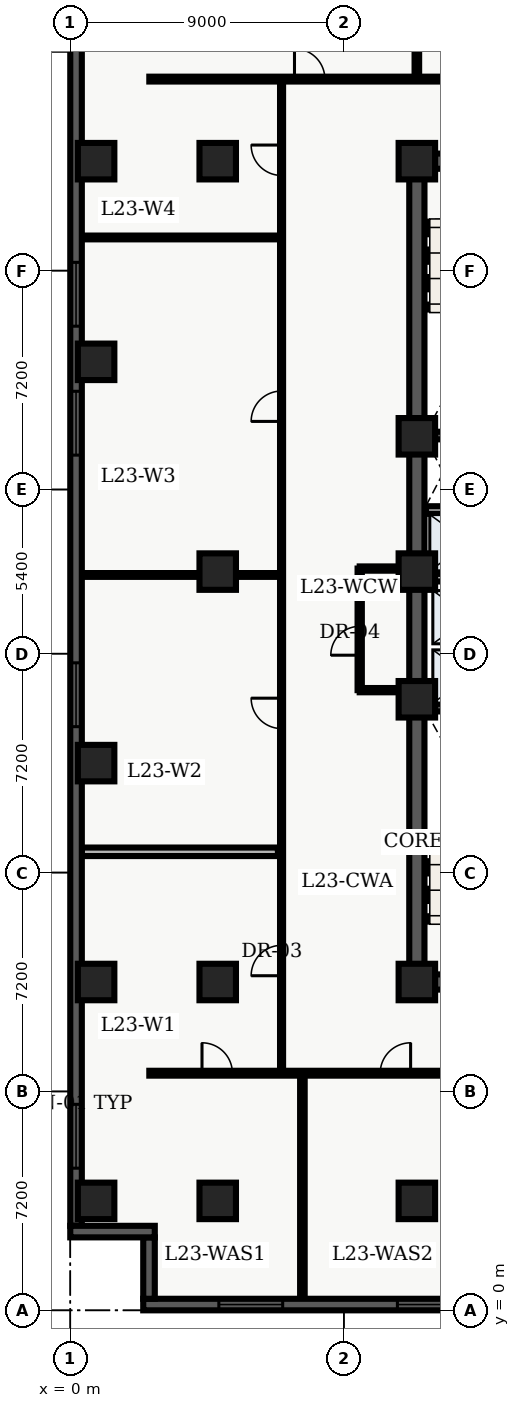
"""IFC4 building model, lengths in metres.
Left out: names, types, materials, properties, quantities, classifications, styles, units other than length and angle.
Written with IfcOpenShell. Run it as: python <this file> out.ifc"""

import sys

from ifc_helpers import new_model, entity, si_unit, converted_unit, direction, frame, origin_with_axes, origin_2d_with_axis, place, context, subcontext, project, spatial, polyline, rectangle, outline, extrude, element, fill, save


model = new_model("IFC4")
c1 = context("Model", 3, precision=1e-05, world=origin_with_axes(), true_north=direction((0.0, 1.0)))
c2 = subcontext(c1, "Body", "Model", "MODEL_VIEW")
j1 = project(units=[si_unit("LENGTHUNIT", "METRE"), converted_unit("PLANEANGLEUNIT", "DEGREE", entity("IfcPlaneAngleMeasure", 0.017), si_unit("PLANEANGLEUNIT", "RADIAN"), dimensions=[0, 0, 0, 0, 0, 0, 0])], contexts=[c1])
p1 = place(None, origin_with_axes())
s1 = spatial("IfcSite", under=j1, at=p1, CompositionType="ELEMENT")
p2 = place(p1, origin_with_axes())
s2 = spatial("IfcBuilding", under=s1, at=p2, CompositionType="ELEMENT")
p3 = place(p2, frame((0.0, 0.0, 96.9), z_axis=(0.0, 0.0, 1.0), x_axis=(1.0, 0.0, 0.0)))
s3 = spatial("IfcBuildingStorey", under=s2, at=p3, CompositionType="ELEMENT", Elevation=96.9)
p4 = place(p3, frame((11.4, 10.8, 0.0), z_axis=(0.0, 0.0, 1.0), x_axis=(0.0, 1.0, 0.0)))
e1 = element("IfcWall", 1, at=p4, inside=s3, PredefinedType="SHEAR", context=c2, shape_type="SweptSolid", body=[
    extrude(outline(polyline([(0.0, -0.25), (27.0, -0.25), (27.0, 0.25), (0.0, 0.25), (0.0, -0.25)])), origin_with_axes(), (0.0, 0.0, 1.0), 3.66),
])
p5 = place(p3, frame((11.4, 10.8, 0.0), z_axis=(0.0, 0.0, 1.0), x_axis=(1.0, 0.0, 0.0)))
e2 = element("IfcWall", 2, at=p5, inside=s3, PredefinedType="SHEAR", context=c2, shape_type="SweptSolid", body=[
    extrude(outline(polyline([(0.0, -0.25), (7.2, -0.25), (7.2, 0.25), (0.0, 0.25), (0.0, -0.25)])), origin_with_axes(), (0.0, 0.0, 1.0), 3.66),
])
p6 = place(p5, frame((2.625, 0.0, 0.0), z_axis=(0.0, 0.0, 1.0), x_axis=(1.0, 0.0, 0.0)))
e3 = element("IfcOpeningElement", 3, at=p6, cuts=e2, PredefinedType="OPENING", context=c2, shape_type="SweptSolid", body=[
    extrude(rectangle(XDim=1.05, YDim=0.52, at=origin_2d_with_axis()), origin_with_axes(), (0.0, 0.0, 1.0), 2.15),
])
p7 = place(p3, frame((11.4, 37.8, 0.0), z_axis=(0.0, 0.0, 1.0), x_axis=(1.0, 0.0, 0.0)))
e4 = element("IfcWall", 4, at=p7, inside=s3, PredefinedType="SHEAR", context=c2, shape_type="SweptSolid", body=[
    extrude(outline(polyline([(0.0, -0.25), (7.2, -0.25), (7.2, 0.25), (0.0, 0.25), (0.0, -0.25)])), origin_with_axes(), (0.0, 0.0, 1.0), 3.66),
])
p8 = place(p7, frame((2.625, 0.0, 0.0), z_axis=(0.0, 0.0, 1.0), x_axis=(1.0, 0.0, 0.0)))
e5 = element("IfcOpeningElement", 5, at=p8, cuts=e4, PredefinedType="OPENING", context=c2, shape_type="SweptSolid", body=[
    extrude(rectangle(XDim=1.05, YDim=0.52, at=origin_2d_with_axis()), origin_with_axes(), (0.0, 0.0, 1.0), 2.15),
])
for number, where, z_axis, x_axis in (
    (6, (11.65, 19.825, 0.0), (0.0, 0.0, 1.0), (1.0, 0.0, 0.0)),
    (7, (11.65, 28.775, 0.0), (0.0, 0.0, 1.0), (1.0, 0.0, 0.0)),
):
    element("IfcWall", number, at=place(p3, frame(where, z_axis=z_axis, x_axis=x_axis)), inside=s3, PredefinedType="SHEAR", context=c2, shape_type="SweptSolid", body=[
        extrude(outline(polyline([(0.0, -0.125), (6.7, -0.125), (6.7, 0.125), (0.0, 0.125), (0.0, -0.125)])), origin_with_axes(), (0.0, 0.0, 1.0), 3.66),
    ])
p9 = place(p3, frame((11.7, 24.1, 0.0), z_axis=(0.0, 0.0, 1.0), x_axis=(1.0, 0.0, 0.0)))
e8 = element("IfcWall", 8, at=p9, inside=s3, PredefinedType="SOLIDWALL", context=c2, shape_type="SweptSolid", body=[
    extrude(outline(polyline([(0.0, -0.125), (6.6, -0.125), (6.6, 0.125), (0.0, 0.125), (0.0, -0.125)])), origin_with_axes(), (0.0, 0.0, 1.0), 2.7),
])
p10 = place(p9, frame((3.75, 0.0, 0.0), z_axis=(0.0, 0.0, 1.0), x_axis=(1.0, 0.0, 0.0)))
e9 = element("IfcOpeningElement", 9, at=p10, cuts=e8, PredefinedType="OPENING", context=c2, shape_type="SweptSolid", body=[
    extrude(rectangle(XDim=0.9, YDim=0.27, at=origin_2d_with_axis()), origin_with_axes(), (0.0, 0.0, 1.0), 2.15),
])
p11 = place(p3, frame((11.7, 26.325, 0.0), z_axis=(0.0, 0.0, 1.0), x_axis=(1.0, 0.0, 0.0)))
e10 = element("IfcWall", 10, at=p11, inside=s3, PredefinedType="SOLIDWALL", context=c2, shape_type="SweptSolid", body=[
    extrude(outline(polyline([(0.0, -0.125), (6.6, -0.125), (6.6, 0.125), (0.0, 0.125), (0.0, -0.125)])), origin_with_axes(), (0.0, 0.0, 1.0), 2.7),
])
p12 = place(p11, frame((3.5, 0.0, 0.0), z_axis=(0.0, 0.0, 1.0), x_axis=(1.0, 0.0, 0.0)))
e11 = element("IfcOpeningElement", 11, at=p12, cuts=e10, PredefinedType="OPENING", context=c2, shape_type="SweptSolid", body=[
    extrude(rectangle(XDim=0.9, YDim=0.27, at=origin_2d_with_axis()), origin_with_axes(), (0.0, 0.0, 1.0), 2.15),
])
for number, where, z_axis, x_axis in (
    (12, (11.4, 3.6, 0.0), (0.0, 0.0, 1.0), (1.0, 0.0, 0.0)),
    (13, (11.4, 10.8, 0.0), (0.0, 0.0, 1.0), (1.0, 0.0, 0.0)),
    (14, (11.4, 20.1, 0.0), (0.0, 0.0, 1.0), (1.0, 0.0, 0.0)),
    (15, (11.4, 24.3, 0.0), (0.0, 0.0, 1.0), (1.0, 0.0, 0.0)),
    (16, (11.4, 28.75, 0.0), (0.0, 0.0, 1.0), (1.0, 0.0, 0.0)),
    (17, (11.4, 37.8, 0.0), (0.0, 0.0, 1.0), (1.0, 0.0, 0.0)),
    (18, (4.85, 3.6, 0.0), (0.0, 0.0, 1.0), (1.0, 0.0, 0.0)),
    (19, (4.85, 10.8, 0.0), (0.0, 0.0, 1.0), (1.0, 0.0, 0.0)),
    (20, (4.85, 24.3, 0.0), (0.0, 0.0, 1.0), (1.0, 0.0, 0.0)),
    (21, (4.85, 37.8, 0.0), (0.0, 0.0, 1.0), (1.0, 0.0, 0.0)),
    (22, (0.85, 3.6, 0.0), (0.0, 0.0, 1.0), (1.0, 0.0, 0.0)),
    (23, (0.85, 10.8, 0.0), (0.0, 0.0, 1.0), (1.0, 0.0, 0.0)),
    (24, (0.85, 18.0, 0.0), (0.0, 0.0, 1.0), (1.0, 0.0, 0.0)),
    (25, (0.85, 31.2, 0.0), (0.0, 0.0, 1.0), (1.0, 0.0, 0.0)),
    (26, (0.85, 37.8, 0.0), (0.0, 0.0, 1.0), (1.0, 0.0, 0.0)),
):
    element("IfcColumn", number, at=place(p3, frame(where, z_axis=z_axis, x_axis=x_axis)), inside=s3, PredefinedType="COLUMN", context=c2, shape_type="SweptSolid", body=[
        extrude(rectangle(XDim=1.2, YDim=1.2, at=origin_2d_with_axis()), origin_with_axes(), (0.0, 0.0, 1.0), 3.9),
    ])
p13 = place(p3, frame((9.52, 20.4, 0.0), z_axis=(0.0, 0.0, 1.0), x_axis=(0.0, 1.0, 0.0)))
e27 = element("IfcWall", 27, at=p13, inside=s3, PredefinedType="PARTITIONING", context=c2, shape_type="SweptSolid", body=[
    extrude(outline(polyline([(0.0, -0.07), (4.0, -0.07), (4.0, 0.07), (0.0, 0.07), (0.0, -0.07)])), origin_with_axes(), (0.0, 0.0, 1.0), 2.7),
])
p14 = place(p13, frame((1.625, 0.0, 0.0), z_axis=(0.0, 0.0, 1.0), x_axis=(1.0, 0.0, 0.0)))
e28 = element("IfcOpeningElement", 28, at=p14, cuts=e27, PredefinedType="OPENING", context=c2, shape_type="SweptSolid", body=[
    extrude(rectangle(XDim=0.95, YDim=0.16, at=origin_2d_with_axis()), origin_with_axes(), (0.0, 0.0, 1.0), 2.15),
])
for number, where, z_axis, x_axis in (
    (29, (9.52, 20.4, 0.0), (0.0, 0.0, 1.0), (1.0, 0.0, 0.0)),
    (30, (9.52, 24.4, 0.0), (0.0, 0.0, 1.0), (1.0, 0.0, 0.0)),
):
    element("IfcWall", number, at=place(p3, frame(where, z_axis=z_axis, x_axis=x_axis)), inside=s3, PredefinedType="PARTITIONING", context=c2, shape_type="SweptSolid", body=[
        extrude(outline(polyline([(0.0, -0.07), (1.58, -0.07), (1.58, 0.07), (0.0, 0.07), (0.0, -0.07)])), origin_with_axes(), (0.0, 0.0, 1.0), 2.7),
    ])
p15 = place(p3, frame((2.6, 7.8, 0.0), z_axis=(0.0, 0.0, 1.0), x_axis=(1.0, 0.0, 0.0)))
e31 = element("IfcWall", 31, at=p15, inside=s3, PredefinedType="PARTITIONING", context=c2, shape_type="SweptSolid", body=[
    extrude(outline(polyline([(0.0, -0.08), (18.625, -0.08), (18.625, 0.08), (0.0, 0.08), (0.0, -0.08)])), origin_with_axes(), (0.0, 0.0, 1.0), 2.7),
])
p16 = place(p15, frame((2.233, 0.0, 0.0), z_axis=(0.0, 0.0, 1.0), x_axis=(1.0, 0.0, 0.0)))
e32 = element("IfcOpeningElement", 32, at=p16, cuts=e31, PredefinedType="OPENING", context=c2, shape_type="SweptSolid", body=[
    extrude(rectangle(XDim=1.0, YDim=0.18, at=origin_2d_with_axis()), origin_with_axes(), (0.0, 0.0, 1.0), 2.15),
])
p17 = place(p15, frame((8.095, 0.0, 0.0), z_axis=(0.0, 0.0, 1.0), x_axis=(1.0, 0.0, 0.0)))
e33 = element("IfcOpeningElement", 33, at=p17, cuts=e31, PredefinedType="OPENING", context=c2, shape_type="SweptSolid", body=[
    extrude(rectangle(XDim=1.0, YDim=0.18, at=origin_2d_with_axis()), origin_with_axes(), (0.0, 0.0, 1.0), 2.15),
])
p18 = place(p15, frame((14.827, 0.0, 0.0), z_axis=(0.0, 0.0, 1.0), x_axis=(1.0, 0.0, 0.0)))
e34 = element("IfcOpeningElement", 34, at=p18, cuts=e31, PredefinedType="OPENING", context=c2, shape_type="SweptSolid", body=[
    extrude(rectangle(XDim=1.0, YDim=0.18, at=origin_2d_with_axis()), origin_with_axes(), (0.0, 0.0, 1.0), 2.15),
])
p19 = place(p3, frame((2.6, 40.5, 0.0), z_axis=(0.0, 0.0, 1.0), x_axis=(1.0, 0.0, 0.0)))
e35 = element("IfcWall", 35, at=p19, inside=s3, PredefinedType="PARTITIONING", context=c2, shape_type="SweptSolid", body=[
    extrude(outline(polyline([(0.0, -0.08), (18.65, -0.08), (18.65, 0.08), (0.0, 0.08), (0.0, -0.08)])), origin_with_axes(), (0.0, 0.0, 1.0), 2.7),
])
p20 = place(p19, frame((5.275, 0.0, 0.0), z_axis=(0.0, 0.0, 1.0), x_axis=(1.0, 0.0, 0.0)))
e36 = element("IfcOpeningElement", 36, at=p20, cuts=e35, PredefinedType="OPENING", context=c2, shape_type="SweptSolid", body=[
    extrude(rectangle(XDim=1.0, YDim=0.18, at=origin_2d_with_axis()), origin_with_axes(), (0.0, 0.0, 1.0), 2.15),
])
p21 = place(p19, frame((12.61, 0.0, 0.0), z_axis=(0.0, 0.0, 1.0), x_axis=(1.0, 0.0, 0.0)))
e37 = element("IfcOpeningElement", 37, at=p21, cuts=e35, PredefinedType="OPENING", context=c2, shape_type="SweptSolid", body=[
    extrude(rectangle(XDim=1.2, YDim=0.18, at=origin_2d_with_axis()), origin_with_axes(), (0.0, 0.0, 1.0), 2.2),
])
p22 = place(p3, frame((6.95, 7.8, 0.0), z_axis=(0.0, 0.0, 1.0), x_axis=(0.0, 1.0, 0.0)))
e38 = element("IfcWall", 38, at=p22, inside=s3, PredefinedType="PARTITIONING", context=c2, shape_type="SweptSolid", body=[
    extrude(outline(polyline([(0.0, -0.05), (32.7, -0.05), (32.7, 0.05), (0.0, 0.05), (0.0, -0.05)])), origin_with_axes(), (0.0, 0.0, 1.0), 2.7),
])
p23 = place(p22, frame((3.707, 0.0, 0.0), z_axis=(0.0, 0.0, 1.0), x_axis=(1.0, 0.0, 0.0)))
e39 = element("IfcOpeningElement", 39, at=p23, cuts=e38, PredefinedType="OPENING", context=c2, shape_type="SweptSolid", body=[
    extrude(rectangle(XDim=1.0, YDim=0.12, at=origin_2d_with_axis()), origin_with_axes(), (0.0, 0.0, 1.0), 2.15),
])
p24 = place(p22, frame((11.836, 0.0, 0.0), z_axis=(0.0, 0.0, 1.0), x_axis=(1.0, 0.0, 0.0)))
e40 = element("IfcOpeningElement", 40, at=p24, cuts=e38, PredefinedType="OPENING", context=c2, shape_type="SweptSolid", body=[
    extrude(rectangle(XDim=1.0, YDim=0.12, at=origin_2d_with_axis()), origin_with_axes(), (0.0, 0.0, 1.0), 2.15),
])
p25 = place(p22, frame((21.94, 0.0, 0.0), z_axis=(0.0, 0.0, 1.0), x_axis=(1.0, 0.0, 0.0)))
e41 = element("IfcOpeningElement", 41, at=p25, cuts=e38, PredefinedType="OPENING", context=c2, shape_type="SweptSolid", body=[
    extrude(rectangle(XDim=1.0, YDim=0.12, at=origin_2d_with_axis()), origin_with_axes(), (0.0, 0.0, 1.0), 2.15),
])
p26 = place(p22, frame((30.03, 0.0, 0.0), z_axis=(0.0, 0.0, 1.0), x_axis=(1.0, 0.0, 0.0)))
e42 = element("IfcOpeningElement", 42, at=p26, cuts=e38, PredefinedType="OPENING", context=c2, shape_type="SweptSolid", body=[
    extrude(rectangle(XDim=1.0, YDim=0.12, at=origin_2d_with_axis()), origin_with_axes(), (0.0, 0.0, 1.0), 2.15),
])
p27 = place(p3, frame((0.375, 15.083, 0.0), z_axis=(0.0, 0.0, 1.0), x_axis=(1.0, 0.0, 0.0)))
e43 = element("IfcWall", 43, at=p27, inside=s3, PredefinedType="PARTITIONING", context=c2, shape_type="SweptSolid", body=[
    extrude(outline(polyline([(0.0, -0.14), (6.455, -0.14), (6.455, 0.14), (0.0, 0.14), (0.0, -0.14)])), origin_with_axes(), (0.0, 0.0, 1.0), 2.7),
])
for number, where, z_axis, x_axis in (
    (44, (0.375, 24.189, 0.0), (0.0, 0.0, 1.0), (1.0, 0.0, 0.0)),
    (45, (0.375, 35.291, 0.0), (0.0, 0.0, 1.0), (1.0, 0.0, 0.0)),
):
    element("IfcWall", number, at=place(p3, frame(where, z_axis=z_axis, x_axis=x_axis)), inside=s3, PredefinedType="PARTITIONING", context=c2, shape_type="SweptSolid", body=[
        extrude(outline(polyline([(0.0, -0.062), (6.455, -0.062), (6.455, 0.062), (0.0, 0.062), (0.0, -0.062)])), origin_with_axes(), (0.0, 0.0, 1.0), 2.7),
    ])
p28 = place(p3, frame((7.635, 0.36, 0.0), z_axis=(0.0, 0.0, 1.0), x_axis=(0.0, 1.0, 0.0)))
e46 = element("IfcWall", 46, at=p28, inside=s3, PredefinedType="PARTITIONING", context=c2, shape_type="SweptSolid", body=[
    extrude(outline(polyline([(0.0, -0.075), (7.34, -0.075), (7.34, 0.075), (0.0, 0.075), (0.0, -0.075)])), origin_with_axes(), (0.0, 0.0, 1.0), 2.7),
])
p29 = place(p3, frame((11.4, 40.6, 0.0), z_axis=(0.0, 0.0, 1.0), x_axis=(0.0, 1.0, 0.0)))
e47 = element("IfcWall", 47, at=p29, inside=s3, PredefinedType="PARTITIONING", context=c2, shape_type="SweptSolid", body=[
    extrude(outline(polyline([(0.0, -0.075), (7.64, -0.075), (7.64, 0.075), (0.0, 0.075), (0.0, -0.075)])), origin_with_axes(), (0.0, 0.0, 1.0), 2.7),
])
p30 = place(p3, frame((0.19, 2.78, 0.0), z_axis=(0.0, 0.0, 1.0), x_axis=(0.0, 1.0, 0.0)))
e48 = element("IfcWall", 48, at=p30, inside=s3, PredefinedType="SOLIDWALL", context=c2, shape_type="SweptSolid", body=[
    extrude(outline(polyline([(0.0, -0.19), (43.42, -0.19), (43.42, 0.19), (0.0, 0.19), (0.0, -0.19)])), origin_with_axes(), (0.0, 0.0, 1.0), 3.66),
])
p31 = place(p30, frame((2.946, 0.0, 0.45), z_axis=(0.0, 0.0, 1.0), x_axis=(1.0, 0.0, 0.0)))
e49 = element("IfcOpeningElement", 49, at=p31, cuts=e48, PredefinedType="OPENING", context=c2, shape_type="SweptSolid", body=[
    extrude(rectangle(XDim=2.1, YDim=0.4, at=origin_2d_with_axis()), origin_with_axes(), (0.0, 0.0, 1.0), 2.2),
])
p32 = place(p30, frame((17.469, 0.0, 0.45), z_axis=(0.0, 0.0, 1.0), x_axis=(1.0, 0.0, 0.0)))
e50 = element("IfcOpeningElement", 50, at=p32, cuts=e48, PredefinedType="OPENING", context=c2, shape_type="SweptSolid", body=[
    extrude(rectangle(XDim=2.1, YDim=0.4, at=origin_2d_with_axis()), origin_with_axes(), (0.0, 0.0, 1.0), 2.2),
])
p33 = place(p30, frame((26.401, 0.0, 0.45), z_axis=(0.0, 0.0, 1.0), x_axis=(1.0, 0.0, 0.0)))
e51 = element("IfcOpeningElement", 51, at=p33, cuts=e48, PredefinedType="OPENING", context=c2, shape_type="SweptSolid", body=[
    extrude(rectangle(XDim=2.1, YDim=0.4, at=origin_2d_with_axis()), origin_with_axes(), (0.0, 0.0, 1.0), 2.2),
])
p34 = place(p30, frame((30.642, 0.0, 0.45), z_axis=(0.0, 0.0, 1.0), x_axis=(1.0, 0.0, 0.0)))
e52 = element("IfcOpeningElement", 52, at=p34, cuts=e48, PredefinedType="OPENING", context=c2, shape_type="SweptSolid", body=[
    extrude(rectangle(XDim=2.1, YDim=0.4, at=origin_2d_with_axis()), origin_with_axes(), (0.0, 0.0, 1.0), 2.2),
])
p35 = place(p30, frame((40.024, 0.0, 0.45), z_axis=(0.0, 0.0, 1.0), x_axis=(1.0, 0.0, 0.0)))
e53 = element("IfcOpeningElement", 53, at=p35, cuts=e48, PredefinedType="OPENING", context=c2, shape_type="SweptSolid", body=[
    extrude(rectangle(XDim=2.1, YDim=0.4, at=origin_2d_with_axis()), origin_with_axes(), (0.0, 0.0, 1.0), 2.2),
])
p36 = place(p3, frame((21.22, 0.19, 0.0), z_axis=(0.0, 0.0, 1.0), x_axis=(-1.0, 0.0, 0.0)))
e54 = element("IfcWall", 54, at=p36, inside=s3, PredefinedType="SOLIDWALL", context=c2, shape_type="SweptSolid", body=[
    extrude(outline(polyline([(0.0, -0.19), (18.82, -0.19), (18.82, 0.19), (0.0, 0.19), (0.0, -0.19)])), origin_with_axes(), (0.0, 0.0, 1.0), 3.66),
])
p37 = place(p36, frame((3.537, 0.0, 0.45), z_axis=(0.0, 0.0, 1.0), x_axis=(1.0, 0.0, 0.0)))
e55 = element("IfcOpeningElement", 55, at=p37, cuts=e54, PredefinedType="OPENING", context=c2, shape_type="SweptSolid", body=[
    extrude(rectangle(XDim=2.1, YDim=0.4, at=origin_2d_with_axis()), origin_with_axes(), (0.0, 0.0, 1.0), 2.2),
])
p38 = place(p36, frame((9.41, 0.0, 0.45), z_axis=(0.0, 0.0, 1.0), x_axis=(1.0, 0.0, 0.0)))
e56 = element("IfcOpeningElement", 56, at=p38, cuts=e54, PredefinedType="OPENING", context=c2, shape_type="SweptSolid", body=[
    extrude(rectangle(XDim=2.1, YDim=0.4, at=origin_2d_with_axis()), origin_with_axes(), (0.0, 0.0, 1.0), 2.2),
])
p39 = place(p36, frame((15.283, 0.0, 0.45), z_axis=(0.0, 0.0, 1.0), x_axis=(1.0, 0.0, 0.0)))
e57 = element("IfcOpeningElement", 57, at=p39, cuts=e54, PredefinedType="OPENING", context=c2, shape_type="SweptSolid", body=[
    extrude(rectangle(XDim=2.1, YDim=0.4, at=origin_2d_with_axis()), origin_with_axes(), (0.0, 0.0, 1.0), 2.2),
])
p40 = place(p3, frame((2.59, 0.38, 0.0), z_axis=(0.0, 0.0, 1.0), x_axis=(0.0, 1.0, 0.0)))
e58 = element("IfcWall", 58, at=p40, inside=s3, PredefinedType="SOLIDWALL", context=c2, shape_type="SweptSolid", body=[
    extrude(outline(polyline([(0.0, -0.19), (2.02, -0.19), (2.02, 0.19), (0.0, 0.19), (0.0, -0.19)])), origin_with_axes(), (0.0, 0.0, 1.0), 3.66),
])
p41 = place(p3, frame((2.78, 2.59, 0.0), z_axis=(0.0, 0.0, 1.0), x_axis=(-1.0, 0.0, 0.0)))
e59 = element("IfcWall", 59, at=p41, inside=s3, PredefinedType="SOLIDWALL", context=c2, shape_type="SweptSolid", body=[
    extrude(outline(polyline([(0.0, -0.19), (2.78, -0.19), (2.78, 0.19), (0.0, 0.19), (0.0, -0.19)])), origin_with_axes(), (0.0, 0.0, 1.0), 3.66),
])
p42 = place(p13, frame((1.625, 0.0, 0.0), z_axis=(0.0, 0.0, 1.0), x_axis=(1.0, 0.0, 0.0)))
e60 = element("IfcDoor", 60, at=p42, inside=s3, OperationType="SINGLE_SWING_LEFT", PredefinedType="DOOR", context=c2, shape_type="SweptSolid", body=[
    extrude(rectangle(XDim=0.95, YDim=0.084, at=origin_2d_with_axis()), origin_with_axes(), (0.0, 0.0, 1.0), 2.15),
])
fill(e28, e60)
p43 = place(p22, frame((3.707, 0.0, 0.0), z_axis=(0.0, 0.0, 1.0), x_axis=(1.0, 0.0, 0.0)))
e61 = element("IfcDoor", 61, at=p43, inside=s3, OperationType="SINGLE_SWING_LEFT", PredefinedType="DOOR", context=c2, shape_type="SweptSolid", body=[
    extrude(rectangle(XDim=1.0, YDim=0.06, at=origin_2d_with_axis()), origin_with_axes(), (0.0, 0.0, 1.0), 2.15),
])
fill(e39, e61)
p44 = place(p22, frame((11.836, 0.0, 0.0), z_axis=(0.0, 0.0, 1.0), x_axis=(1.0, 0.0, 0.0)))
e62 = element("IfcDoor", 62, at=p44, inside=s3, OperationType="SINGLE_SWING_RIGHT", PredefinedType="DOOR", context=c2, shape_type="SweptSolid", body=[
    extrude(rectangle(XDim=1.0, YDim=0.06, at=origin_2d_with_axis()), origin_with_axes(), (0.0, 0.0, 1.0), 2.15),
])
fill(e40, e62)
p45 = place(p22, frame((21.94, 0.0, 0.0), z_axis=(0.0, 0.0, 1.0), x_axis=(1.0, 0.0, 0.0)))
e63 = element("IfcDoor", 63, at=p45, inside=s3, OperationType="SINGLE_SWING_LEFT", PredefinedType="DOOR", context=c2, shape_type="SweptSolid", body=[
    extrude(rectangle(XDim=1.0, YDim=0.06, at=origin_2d_with_axis()), origin_with_axes(), (0.0, 0.0, 1.0), 2.15),
])
fill(e41, e63)
p46 = place(p22, frame((30.03, 0.0, 0.0), z_axis=(0.0, 0.0, 1.0), x_axis=(1.0, 0.0, 0.0)))
e64 = element("IfcDoor", 64, at=p46, inside=s3, OperationType="SINGLE_SWING_RIGHT", PredefinedType="DOOR", context=c2, shape_type="SweptSolid", body=[
    extrude(rectangle(XDim=1.0, YDim=0.06, at=origin_2d_with_axis()), origin_with_axes(), (0.0, 0.0, 1.0), 2.15),
])
fill(e42, e64)
p47 = place(p15, frame((2.233, 0.0, 0.0), z_axis=(0.0, 0.0, 1.0), x_axis=(1.0, 0.0, 0.0)))
e65 = element("IfcDoor", 65, at=p47, inside=s3, OperationType="SINGLE_SWING_LEFT", PredefinedType="DOOR", context=c2, shape_type="SweptSolid", body=[
    extrude(rectangle(XDim=1.0, YDim=0.09, at=origin_2d_with_axis()), origin_with_axes(), (0.0, 0.0, 1.0), 2.15),
])
fill(e32, e65)
p48 = place(p15, frame((8.095, 0.0, 0.0), z_axis=(0.0, 0.0, 1.0), x_axis=(1.0, 0.0, 0.0)))
e66 = element("IfcDoor", 66, at=p48, inside=s3, OperationType="SINGLE_SWING_RIGHT", PredefinedType="DOOR", context=c2, shape_type="SweptSolid", body=[
    extrude(rectangle(XDim=1.0, YDim=0.09, at=origin_2d_with_axis()), origin_with_axes(), (0.0, 0.0, 1.0), 2.15),
])
fill(e33, e66)
p49 = place(p19, frame((5.275, 0.0, 0.0), z_axis=(0.0, 0.0, 1.0), x_axis=(1.0, 0.0, 0.0)))
e67 = element("IfcDoor", 67, at=p49, inside=s3, OperationType="SINGLE_SWING_LEFT", PredefinedType="DOOR", context=c2, shape_type="SweptSolid", body=[
    extrude(rectangle(XDim=1.0, YDim=0.09, at=origin_2d_with_axis()), origin_with_axes(), (0.0, 0.0, 1.0), 2.15),
])
fill(e36, e67)
p50 = place(p30, frame((2.946, 0.0, 0.45), z_axis=(0.0, 0.0, 1.0), x_axis=(1.0, 0.0, 0.0)))
e68 = element("IfcWindow", 68, at=p50, inside=s3, PredefinedType="WINDOW", context=c2, shape_type="SweptSolid", body=[
    extrude(rectangle(XDim=2.1, YDim=0.09, at=origin_2d_with_axis()), origin_with_axes(), (0.0, 0.0, 1.0), 2.2),
])
fill(e49, e68)
p51 = place(p30, frame((17.469, 0.0, 0.45), z_axis=(0.0, 0.0, 1.0), x_axis=(1.0, 0.0, 0.0)))
e69 = element("IfcWindow", 69, at=p51, inside=s3, PredefinedType="WINDOW", context=c2, shape_type="SweptSolid", body=[
    extrude(rectangle(XDim=2.1, YDim=0.09, at=origin_2d_with_axis()), origin_with_axes(), (0.0, 0.0, 1.0), 2.2),
])
fill(e50, e69)
p52 = place(p30, frame((26.401, 0.0, 0.45), z_axis=(0.0, 0.0, 1.0), x_axis=(1.0, 0.0, 0.0)))
e70 = element("IfcWindow", 70, at=p52, inside=s3, PredefinedType="WINDOW", context=c2, shape_type="SweptSolid", body=[
    extrude(rectangle(XDim=2.1, YDim=0.09, at=origin_2d_with_axis()), origin_with_axes(), (0.0, 0.0, 1.0), 2.2),
])
fill(e51, e70)
p53 = place(p30, frame((30.642, 0.0, 0.45), z_axis=(0.0, 0.0, 1.0), x_axis=(1.0, 0.0, 0.0)))
e71 = element("IfcWindow", 71, at=p53, inside=s3, PredefinedType="WINDOW", context=c2, shape_type="SweptSolid", body=[
    extrude(rectangle(XDim=2.1, YDim=0.09, at=origin_2d_with_axis()), origin_with_axes(), (0.0, 0.0, 1.0), 2.2),
])
fill(e52, e71)
p54 = place(p36, frame((9.41, 0.0, 0.45), z_axis=(0.0, 0.0, 1.0), x_axis=(1.0, 0.0, 0.0)))
e72 = element("IfcWindow", 72, at=p54, inside=s3, PredefinedType="WINDOW", context=c2, shape_type="SweptSolid", body=[
    extrude(rectangle(XDim=2.1, YDim=0.09, at=origin_2d_with_axis()), origin_with_axes(), (0.0, 0.0, 1.0), 2.2),
])
fill(e56, e72)
p55 = place(p36, frame((15.283, 0.0, 0.45), z_axis=(0.0, 0.0, 1.0), x_axis=(1.0, 0.0, 0.0)))
e73 = element("IfcWindow", 73, at=p55, inside=s3, PredefinedType="WINDOW", context=c2, shape_type="SweptSolid", body=[
    extrude(rectangle(XDim=2.1, YDim=0.09, at=origin_2d_with_axis()), origin_with_axes(), (0.0, 0.0, 1.0), 2.2),
])
fill(e57, e73)
save(model, sys.argv[1])
